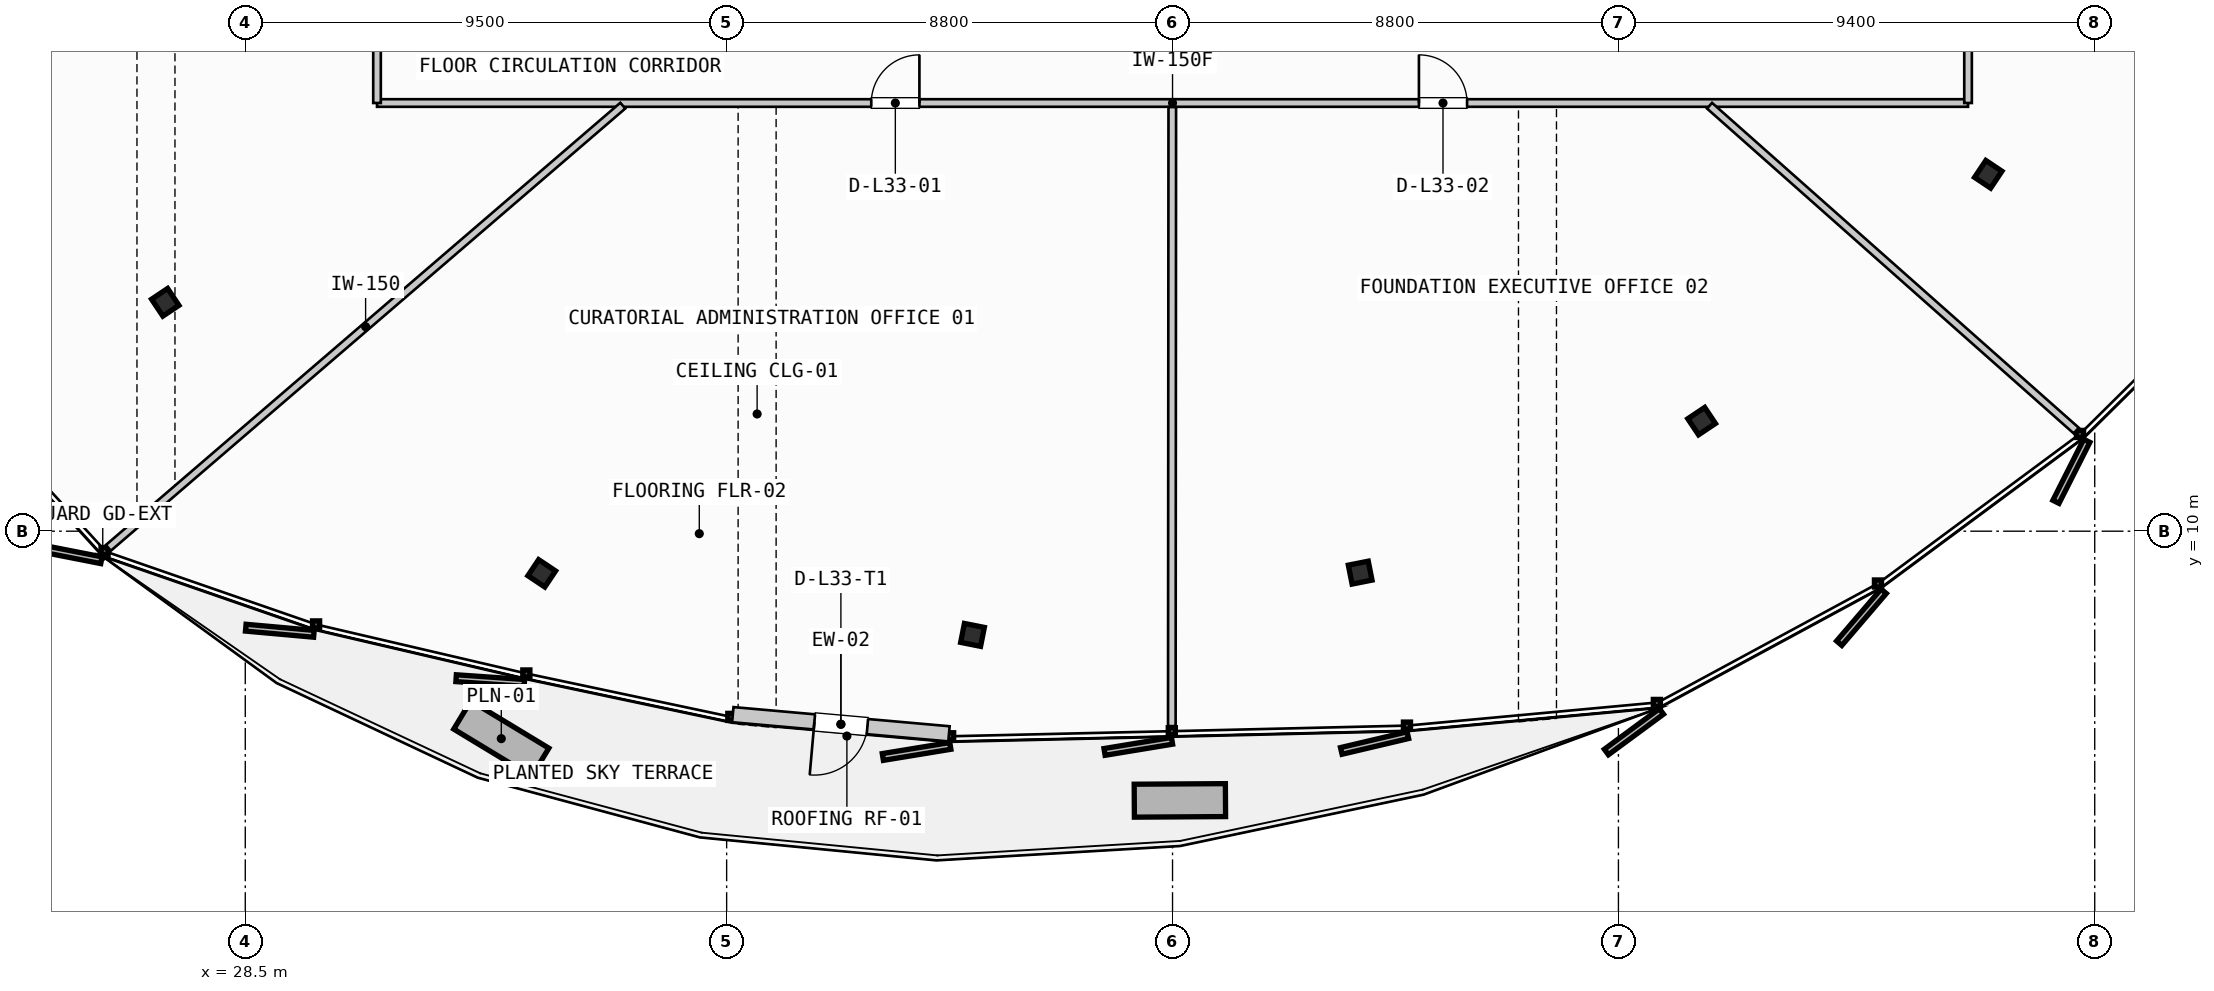
"""IFC4 building model, lengths in metres.
Left out: names, types, materials, properties, quantities, classifications, styles, units other than length and angle.
Written with IfcOpenShell. Run it as: python <this file> out.ifc"""

import sys

from ifc_helpers import new_model, si_unit, direction, frame, frame_2d, origin, origin_2d, place, context, subcontext, project, spatial, rectangle, i_section, extrude, source, transform, mapped, element, fill, save


model = new_model("IFC4")
c1 = context("Model", 3, precision=1e-05, world=origin(), true_north=direction((0.0, 1.0)))
c2 = subcontext(c1, "Body", "Model", "MODEL_VIEW")
j1 = project(units=[si_unit("LENGTHUNIT", "METRE"), si_unit("PLANEANGLEUNIT", "RADIAN")], contexts=[c1])
p1 = place(None, origin())
s1 = spatial("IfcSite", under=j1, at=p1, CompositionType="ELEMENT")
p2 = place(p1, origin())
s2 = spatial("IfcBuilding", under=s1, at=p2, CompositionType="ELEMENT")
p3 = place(p2, frame((0.0, 0.0, 132.35)))
s3 = spatial("IfcBuildingStorey", under=s2, at=p3, CompositionType="ELEMENT", Elevation=132.35)
m1 = source(origin(), c2, "Body", "SweptSolid", [
    extrude(i_section(OverallWidth=0.401, OverallDepth=0.381, WebThickness=0.032, FlangeThickness=0.051, FilletRadius=0.015, at=origin_2d()), origin(), (0.0, 0.0, 1.0), 3.3),
])
for number, where, z_axis, x_axis in (
    (1, (26.921, 14.517, 0.0), (0.0, 0.0, 1.0), (-0.831, -0.556, 0.0)),
    (2, (34.351, 9.168, 0.0), (0.0, 0.0, 1.0), (-0.556, -0.831, 0.0)),
    (3, (42.852, 7.954, 0.0), (0.0, 0.0, 1.0), (-0.195, -0.981, 0.0)),
    (4, (50.503, 9.182, 0.0), (0.0, 0.0, 1.0), (0.195, -0.981, 0.0)),
    (5, (57.242, 12.172, 0.0), (0.0, 0.0, 1.0), (0.556, -0.831, 0.0)),
    (6, (62.899, 17.043, 0.0), (0.0, 0.0, 1.0), (0.831, -0.556, 0.0)),
):
    element("IfcColumn", number, at=place(p3, frame(where, z_axis=z_axis, x_axis=x_axis)), inside=s3, PredefinedType="COLUMN", context=c2, shape_type="MappedRepresentation", body=[
        mapped(m1, transform((0.0, 0.0, 0.0), scale=1.0)),
    ])
p4 = place(p3, frame((42.388, 6.001, 0.0), z_axis=(0.0, 0.0, 1.0), x_axis=(-0.996093949993, 0.088299732662, 0.0)))
e7 = element("IfcWall", 7, at=p4, inside=s3, PredefinedType="SOLIDWALL", context=c2, shape_type="SweptSolid", body=[
    extrude(rectangle(XDim=4.283, YDim=0.3, at=frame_2d((2.142, 0.0))), origin(), (0.0, 0.0, 1.0), 2.725),
])
p5 = place(p4, frame((1.616, 0.0, 0.0)))
e8 = element("IfcOpeningElement", 8, at=p5, cuts=e7, PredefinedType="OPENING", context=c2, shape_type="SweptSolid", body=[
    extrude(rectangle(XDim=1.05, YDim=2.2, at=frame_2d((0.525, 1.1))), frame((0.0, 0.16, 0.0), z_axis=(0.0, -1.0, 0.0), x_axis=(1.0, 0.0, 0.0)), (0.0, 0.0, 1.0), 0.32),
])
p6 = place(p3, frame((31.1, 18.45, 0.0), z_axis=(0.0, 0.0, 1.0), x_axis=(1.0, 0.0, 0.0)))
e9 = element("IfcWall", 9, at=p6, inside=s3, PredefinedType="PARTITIONING", context=c2, shape_type="SweptSolid", body=[
    extrude(rectangle(XDim=31.4, YDim=0.15, at=frame_2d((15.7, 0.0))), origin(), (0.0, 0.0, 1.0), 2.445),
])
p7 = place(p6, frame((9.754, 0.0, 0.0)))
e10 = element("IfcOpeningElement", 10, at=p7, cuts=e9, PredefinedType="OPENING", context=c2, shape_type="SweptSolid", body=[
    extrude(rectangle(XDim=0.95, YDim=2.15, at=frame_2d((0.475, 1.075))), frame((0.0, 0.085, 0.0), z_axis=(0.0, -1.0, 0.0), x_axis=(1.0, 0.0, 0.0)), (0.0, 0.0, 1.0), 0.17),
])
p8 = place(p6, frame((20.563, 0.0, 0.0)))
e11 = element("IfcOpeningElement", 11, at=p8, cuts=e9, PredefinedType="OPENING", context=c2, shape_type="SweptSolid", body=[
    extrude(rectangle(XDim=0.95, YDim=2.15, at=frame_2d((0.475, 1.075))), frame((0.0, 0.085, 0.0), z_axis=(0.0, -1.0, 0.0), x_axis=(1.0, 0.0, 0.0)), (0.0, 0.0, 1.0), 0.17),
])
for number, where, z_axis, x_axis in (
    (12, (62.5, 18.45, 0.0), (0.0, 0.0, 1.0), (0.0, 1.0, 0.0)),
    (13, (31.1, 20.15, 0.0), (0.0, 0.0, 1.0), (0.0, -1.0, 0.0)),
):
    element("IfcWall", number, at=place(p3, frame(where, z_axis=z_axis, x_axis=x_axis)), inside=s3, PredefinedType="PARTITIONING", context=c2, shape_type="SweptSolid", body=[
        extrude(rectangle(XDim=1.7, YDim=0.15, at=frame_2d((0.85, 0.0))), origin(), (0.0, 0.0, 1.0), 2.445),
    ])
p9 = place(p3, frame((35.951, 18.398, 0.0), z_axis=(0.0, 0.0, 1.0), x_axis=(-0.758343132759, -0.651855576793, 0.0)))
e14 = element("IfcWall", 14, at=p9, inside=s3, PredefinedType="PARTITIONING", context=c2, shape_type="SweptSolid", body=[
    extrude(rectangle(XDim=13.387, YDim=0.15, at=frame_2d((6.693, 0.0))), origin(), (0.0, 0.0, 1.0), 2.445),
])
p10 = place(p3, frame((46.795, 18.37, 0.0), z_axis=(0.0, 0.0, 1.0), x_axis=(-0.000739423048, -0.999999726627, 0.0)))
e15 = element("IfcWall", 15, at=p10, inside=s3, PredefinedType="PARTITIONING", context=c2, shape_type="SweptSolid", body=[
    extrude(rectangle(XDim=12.217, YDim=0.15, at=frame_2d((6.108, 0.0))), origin(), (0.0, 0.0, 1.0), 2.445),
])
p11 = place(p3, frame((57.398, 18.397, 0.0), z_axis=(0.0, 0.0, 1.0), x_axis=(0.748504738048, -0.663129442206, 0.0)))
e16 = element("IfcWall", 16, at=p11, inside=s3, PredefinedType="PARTITIONING", context=c2, shape_type="SweptSolid", body=[
    extrude(rectangle(XDim=9.668, YDim=0.15, at=frame_2d((4.834, 0.0))), origin(), (0.0, 0.0, 1.0), 2.445),
])
m2 = source(origin(), c2, "Body", "SweptSolid", [
    extrude(rectangle(XDim=1.05, YDim=2.2, at=frame_2d((0.525, 1.1))), frame((0.0, 0.025, 0.0), z_axis=(0.0, -1.0, 0.0), x_axis=(1.0, 0.0, 0.0)), (0.0, 0.0, 1.0), 0.05),
])
p12 = place(p5, origin())
e17 = element("IfcDoor", 17, at=p12, inside=s3, OperationType="SINGLE_SWING_RIGHT", PredefinedType="DOOR", context=c2, shape_type="MappedRepresentation", body=[
    mapped(m2, transform((0.0, 0.0, 0.0), scale=1.0)),
])
fill(e8, e17)
m3 = source(origin(), c2, "Body", "SweptSolid", [
    extrude(rectangle(XDim=0.95, YDim=2.15, at=frame_2d((0.475, 1.075))), frame((0.0, 0.025, 0.0), z_axis=(0.0, -1.0, 0.0), x_axis=(1.0, 0.0, 0.0)), (0.0, 0.0, 1.0), 0.05),
])
p13 = place(p7, origin())
e18 = element("IfcDoor", 18, at=p13, inside=s3, OperationType="SINGLE_SWING_RIGHT", PredefinedType="DOOR", context=c2, shape_type="MappedRepresentation", body=[
    mapped(m3, transform((0.0, 0.0, 0.0), scale=1.0)),
])
fill(e10, e18)
p14 = place(p8, origin())
e19 = element("IfcDoor", 19, at=p14, inside=s3, OperationType="SINGLE_SWING_LEFT", PredefinedType="DOOR", context=c2, shape_type="MappedRepresentation", body=[
    mapped(m3, transform((0.0, 0.0, 0.0), scale=1.0)),
])
fill(e11, e19)
save(model, sys.argv[1])
